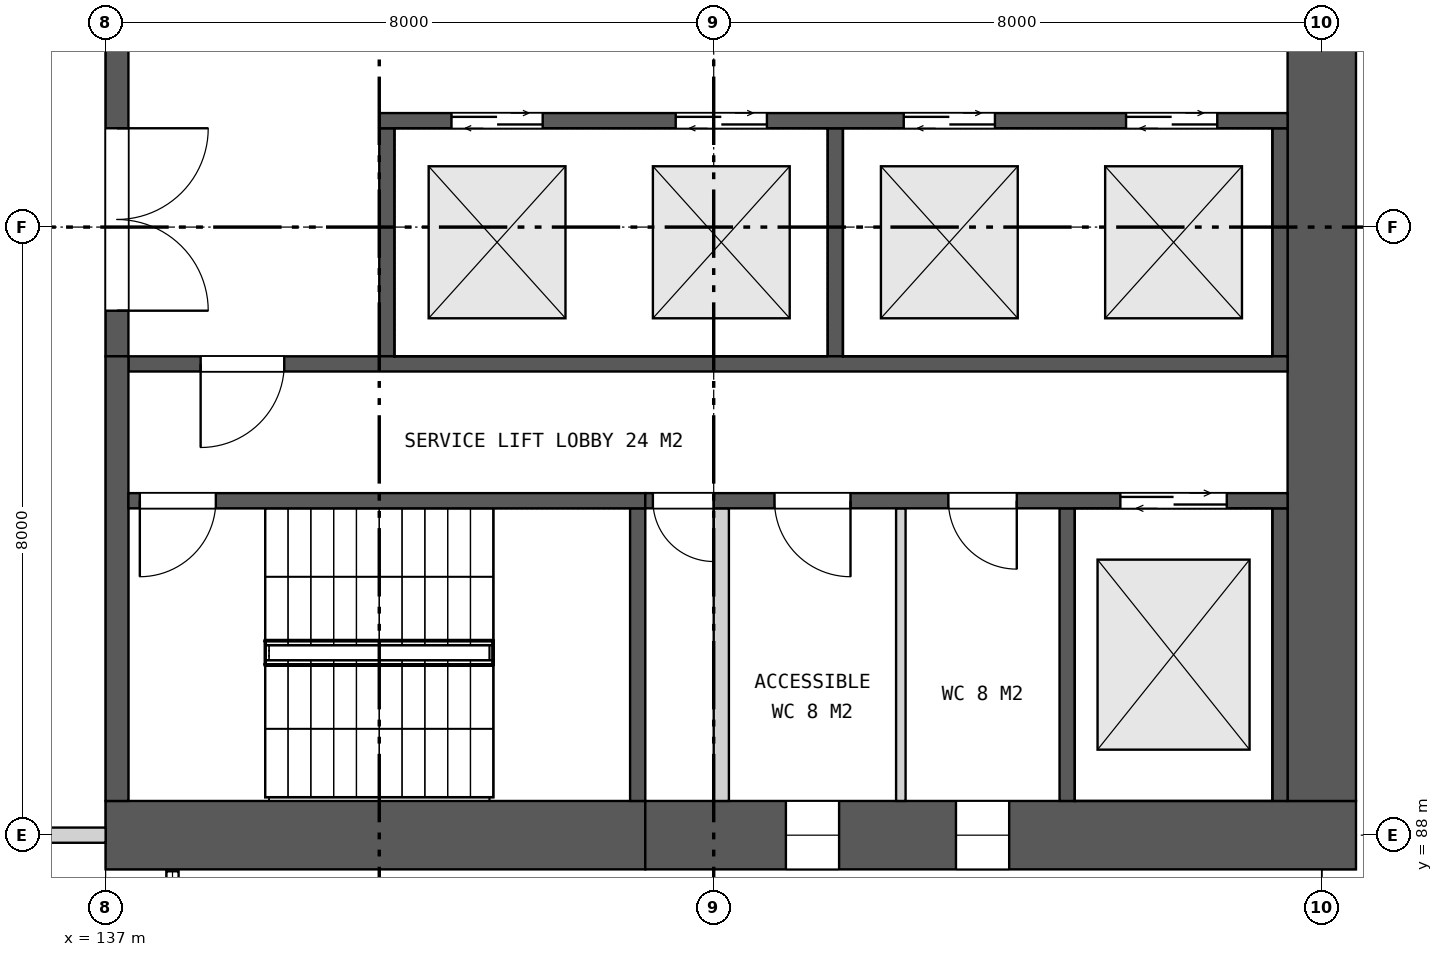
"""IFC4 building model, lengths in metres.
Left out: names, types, materials, properties, quantities, classifications, styles, units other than length and angle.
Written with IfcOpenShell. Run it as: python <this file> out.ifc"""

import sys

from ifc_helpers import new_model, si_unit, direction, frame, frame_2d, origin, place, context, subcontext, project, spatial, rectangle, extrude, element, fill, save


model = new_model("IFC4")
c1 = context("Model", 3, precision=1e-05, world=origin(), true_north=direction((0.0, 1.0)))
c2 = subcontext(c1, "Body", "Model", "MODEL_VIEW")
j1 = project(units=[si_unit("LENGTHUNIT", "METRE"), si_unit("PLANEANGLEUNIT", "RADIAN")], contexts=[c1])
p1 = place(None, origin())
s1 = spatial("IfcSite", under=j1, at=p1, CompositionType="ELEMENT")
p2 = place(p1, origin())
s2 = spatial("IfcBuilding", under=s1, at=p2, CompositionType="ELEMENT")
p3 = place(p2, frame((0.0, 0.0, 17.5)))
s3 = spatial("IfcBuildingStorey", under=s2, at=p3, CompositionType="ELEMENT", Elevation=17.5)
p4 = place(p3, frame((137.0, 88.0, 0.0), z_axis=(0.0, 0.0, 1.0), x_axis=(1.0, 0.0, 0.0)))
e1 = element("IfcWall", 1, at=p4, inside=s3, PredefinedType="SHEAR", context=c2, shape_type="SweptSolid", body=[
    extrude(rectangle(XDim=7.1, YDim=0.9, at=frame_2d((3.55, 0.0))), origin(), (0.0, 0.0, 1.0), 7.5),
])
p5 = place(p3, frame((144.1, 88.0, 0.0), z_axis=(0.0, 0.0, 1.0), x_axis=(1.0, 0.0, 0.0)))
e2 = element("IfcWall", 2, at=p5, inside=s3, PredefinedType="SHEAR", context=c2, shape_type="SweptSolid", body=[
    extrude(rectangle(XDim=9.35, YDim=0.9, at=frame_2d((4.675, 0.0))), origin(), (0.0, 0.0, 1.0), 7.5),
])
p6 = place(p5, frame((1.85, 0.0, 1.5)))
e3 = element("IfcOpeningElement", 3, at=p6, cuts=e2, PredefinedType="OPENING", context=c2, shape_type="SweptSolid", body=[
    extrude(rectangle(XDim=0.7, YDim=0.9, at=frame_2d((0.35, 0.45))), frame((0.0, 0.46, 0.0), z_axis=(0.0, -1.0, 0.0), x_axis=(1.0, 0.0, 0.0)), (0.0, 0.0, 1.0), 0.92),
])
p7 = place(p5, frame((4.087, 0.0, 1.5)))
e4 = element("IfcOpeningElement", 4, at=p7, cuts=e2, PredefinedType="OPENING", context=c2, shape_type="SweptSolid", body=[
    extrude(rectangle(XDim=0.7, YDim=0.9, at=frame_2d((0.35, 0.45))), frame((0.0, 0.46, 0.0), z_axis=(0.0, -1.0, 0.0), x_axis=(1.0, 0.0, 0.0)), (0.0, 0.0, 1.0), 0.92),
])
p8 = place(p3, frame((153.0, 88.45, 0.0), z_axis=(0.0, 0.0, 1.0), x_axis=(0.0, 1.0, 0.0)))
e5 = element("IfcWall", 5, at=p8, inside=s3, PredefinedType="SHEAR", context=c2, shape_type="SweptSolid", body=[
    extrude(rectangle(XDim=23.1, YDim=0.9, at=frame_2d((11.55, 0.0))), origin(), (0.0, 0.0, 1.0), 7.5),
])
p9 = place(p8, frame((10.35, 0.0, 0.0)))
e6 = element("IfcOpeningElement", 6, at=p9, cuts=e5, PredefinedType="OPENING", context=c2, shape_type="SweptSolid", body=[
    extrude(rectangle(XDim=2.4, YDim=2.4, at=frame_2d((1.2, 1.2))), frame((0.0, 0.46, 0.0), z_axis=(0.0, -1.0, 0.0), x_axis=(1.0, 0.0, 0.0)), (0.0, 0.0, 1.0), 0.92),
])
p10 = place(p3, frame((137.15, 94.3, 0.0), z_axis=(0.0, 0.0, 1.0), x_axis=(0.0, 1.0, 0.0)))
e7 = element("IfcWall", 7, at=p10, inside=s3, PredefinedType="SHEAR", context=c2, shape_type="SweptSolid", body=[
    extrude(rectangle(XDim=11.4, YDim=0.3, at=frame_2d((5.7, 0.0))), origin(), (0.0, 0.0, 1.0), 7.5),
])
p11 = place(p10, frame((0.6, 0.0, 0.0)))
e8 = element("IfcOpeningElement", 8, at=p11, cuts=e7, PredefinedType="OPENING", context=c2, shape_type="SweptSolid", body=[
    extrude(rectangle(XDim=2.4, YDim=2.4, at=frame_2d((1.2, 1.2))), frame((0.0, 0.16, 0.0), z_axis=(0.0, -1.0, 0.0), x_axis=(1.0, 0.0, 0.0)), (0.0, 0.0, 1.0), 0.32),
])
p12 = place(p10, frame((4.5, 0.0, 0.0)))
e9 = element("IfcOpeningElement", 9, at=p12, cuts=e7, PredefinedType="OPENING", context=c2, shape_type="SweptSolid", body=[
    extrude(rectangle(XDim=2.4, YDim=2.4, at=frame_2d((1.2, 1.2))), frame((0.0, 0.16, 0.0), z_axis=(0.0, -1.0, 0.0), x_axis=(1.0, 0.0, 0.0)), (0.0, 0.0, 1.0), 0.32),
])
p13 = place(p10, frame((8.4, 0.0, 0.0)))
e10 = element("IfcOpeningElement", 10, at=p13, cuts=e7, PredefinedType="OPENING", context=c2, shape_type="SweptSolid", body=[
    extrude(rectangle(XDim=2.4, YDim=2.4, at=frame_2d((1.2, 1.2))), frame((0.0, 0.16, 0.0), z_axis=(0.0, -1.0, 0.0), x_axis=(1.0, 0.0, 0.0)), (0.0, 0.0, 1.0), 0.32),
])
for number, where, z_axis, x_axis in (
    (11, (140.7, 94.3, 0.0), (0.0, 0.0, 1.0), (0.0, 1.0, 0.0)),
    (12, (146.6, 94.3, 0.0), (0.0, 0.0, 1.0), (0.0, 1.0, 0.0)),
    (13, (152.45, 94.3, 0.0), (0.0, 0.0, 1.0), (0.0, 1.0, 0.0)),
):
    element("IfcWall", number, at=place(p3, frame(where, z_axis=z_axis, x_axis=x_axis)), inside=s3, PredefinedType="SHEAR", context=c2, shape_type="SweptSolid", body=[
        extrude(rectangle(XDim=3.0, YDim=0.2, at=frame_2d((1.5, 0.0))), origin(), (0.0, 0.0, 1.0), 7.5),
    ])
p14 = place(p3, frame((140.6, 97.4, 0.0), z_axis=(0.0, 0.0, 1.0), x_axis=(1.0, 0.0, 0.0)))
e14 = element("IfcWall", 14, at=p14, inside=s3, PredefinedType="SHEAR", context=c2, shape_type="SweptSolid", body=[
    extrude(rectangle(XDim=11.95, YDim=0.2, at=frame_2d((5.975, 0.0))), origin(), (0.0, 0.0, 1.0), 7.5),
])
p15 = place(p14, frame((0.95, 0.0, 0.0)))
e15 = element("IfcOpeningElement", 15, at=p15, cuts=e14, PredefinedType="OPENING", context=c2, shape_type="SweptSolid", body=[
    extrude(rectangle(XDim=1.2, YDim=2.1, at=frame_2d((0.6, 1.05))), frame((0.0, 0.11, 0.0), z_axis=(0.0, -1.0, 0.0), x_axis=(1.0, 0.0, 0.0)), (0.0, 0.0, 1.0), 0.22),
])
p16 = place(p14, frame((3.9, 0.0, 0.0)))
e16 = element("IfcOpeningElement", 16, at=p16, cuts=e14, PredefinedType="OPENING", context=c2, shape_type="SweptSolid", body=[
    extrude(rectangle(XDim=1.2, YDim=2.1, at=frame_2d((0.6, 1.05))), frame((0.0, 0.11, 0.0), z_axis=(0.0, -1.0, 0.0), x_axis=(1.0, 0.0, 0.0)), (0.0, 0.0, 1.0), 0.22),
])
p17 = place(p14, frame((6.9, 0.0, 0.0)))
e17 = element("IfcOpeningElement", 17, at=p17, cuts=e14, PredefinedType="OPENING", context=c2, shape_type="SweptSolid", body=[
    extrude(rectangle(XDim=1.2, YDim=2.1, at=frame_2d((0.6, 1.05))), frame((0.0, 0.11, 0.0), z_axis=(0.0, -1.0, 0.0), x_axis=(1.0, 0.0, 0.0)), (0.0, 0.0, 1.0), 0.22),
])
p18 = place(p14, frame((9.825, 0.0, 0.0)))
e18 = element("IfcOpeningElement", 18, at=p18, cuts=e14, PredefinedType="OPENING", context=c2, shape_type="SweptSolid", body=[
    extrude(rectangle(XDim=1.2, YDim=2.1, at=frame_2d((0.6, 1.05))), frame((0.0, 0.11, 0.0), z_axis=(0.0, -1.0, 0.0), x_axis=(1.0, 0.0, 0.0)), (0.0, 0.0, 1.0), 0.22),
])
p19 = place(p3, frame((137.3, 94.2, 0.0), z_axis=(0.0, 0.0, 1.0), x_axis=(1.0, 0.0, 0.0)))
e19 = element("IfcWall", 19, at=p19, inside=s3, PredefinedType="SHEAR", context=c2, shape_type="SweptSolid", body=[
    extrude(rectangle(XDim=15.25, YDim=0.2, at=frame_2d((7.625, 0.0))), origin(), (0.0, 0.0, 1.0), 7.5),
])
p20 = place(p19, frame((0.95, 0.0, 0.0)))
e20 = element("IfcOpeningElement", 20, at=p20, cuts=e19, PredefinedType="OPENING", context=c2, shape_type="SweptSolid", body=[
    extrude(rectangle(XDim=1.1, YDim=2.1, at=frame_2d((0.55, 1.05))), frame((0.0, 0.11, 0.0), z_axis=(0.0, -1.0, 0.0), x_axis=(1.0, 0.0, 0.0)), (0.0, 0.0, 1.0), 0.22),
])
p21 = place(p3, frame((137.15, 88.45, 0.0), z_axis=(0.0, 0.0, 1.0), x_axis=(0.0, 1.0, 0.0)))
e21 = element("IfcWall", 21, at=p21, inside=s3, PredefinedType="SHEAR", context=c2, shape_type="SweptSolid", body=[
    extrude(rectangle(XDim=5.85, YDim=0.3, at=frame_2d((2.925, 0.0))), origin(), (0.0, 0.0, 1.0), 7.5),
])
for number, where, z_axis, x_axis in (
    (22, (144.0, 88.45, 0.0), (0.0, 0.0, 1.0), (0.0, 1.0, 0.0)),
    (23, (149.65, 88.45, 0.0), (0.0, 0.0, 1.0), (0.0, 1.0, 0.0)),
    (24, (152.45, 88.45, 0.0), (0.0, 0.0, 1.0), (0.0, 1.0, 0.0)),
):
    element("IfcWall", number, at=place(p3, frame(where, z_axis=z_axis, x_axis=x_axis)), inside=s3, PredefinedType="SHEAR", context=c2, shape_type="SweptSolid", body=[
        extrude(rectangle(XDim=3.85, YDim=0.2, at=frame_2d((1.925, 0.0))), origin(), (0.0, 0.0, 1.0), 7.5),
    ])
p22 = place(p3, frame((145.1, 88.45, 0.0), z_axis=(0.0, 0.0, 1.0), x_axis=(0.0, 1.0, 0.0)))
e25 = element("IfcWall", 25, at=p22, inside=s3, PredefinedType="PARTITIONING", context=c2, shape_type="SweptSolid", body=[
    extrude(rectangle(XDim=3.85, YDim=0.2, at=frame_2d((1.925, 0.0))), origin(), (0.0, 0.0, 1.0), 7.5),
])
p23 = place(p3, frame((147.462, 88.45, 0.0), z_axis=(0.0, 0.0, 1.0), x_axis=(0.0, 1.0, 0.0)))
e26 = element("IfcWall", 26, at=p23, inside=s3, PredefinedType="PARTITIONING", context=c2, shape_type="SweptSolid", body=[
    extrude(rectangle(XDim=3.85, YDim=0.125, at=frame_2d((1.925, 0.0))), origin(), (0.0, 0.0, 1.0), 7.5),
])
p24 = place(p3, frame((137.3, 92.4, 0.0), z_axis=(0.0, 0.0, 1.0), x_axis=(1.0, 0.0, 0.0)))
e27 = element("IfcWall", 27, at=p24, inside=s3, PredefinedType="SHEAR", context=c2, shape_type="SweptSolid", body=[
    extrude(rectangle(XDim=6.8, YDim=0.2, at=frame_2d((3.4, 0.0))), origin(), (0.0, 0.0, 1.0), 7.5),
])
p25 = place(p24, frame((0.15, 0.0, 0.0)))
e28 = element("IfcOpeningElement", 28, at=p25, cuts=e27, PredefinedType="OPENING", context=c2, shape_type="SweptSolid", body=[
    extrude(rectangle(XDim=1.0, YDim=2.1, at=frame_2d((0.5, 1.05))), frame((0.0, 0.11, 0.0), z_axis=(0.0, -1.0, 0.0), x_axis=(1.0, 0.0, 0.0)), (0.0, 0.0, 1.0), 0.22),
])
p26 = place(p3, frame((144.1, 92.4, 0.0), z_axis=(0.0, 0.0, 1.0), x_axis=(1.0, 0.0, 0.0)))
e29 = element("IfcWall", 29, at=p26, inside=s3, PredefinedType="SHEAR", context=c2, shape_type="SweptSolid", body=[
    extrude(rectangle(XDim=8.45, YDim=0.2, at=frame_2d((4.225, 0.0))), origin(), (0.0, 0.0, 1.0), 7.5),
])
p27 = place(p26, frame((0.1, 0.0, 0.0)))
e30 = element("IfcOpeningElement", 30, at=p27, cuts=e29, PredefinedType="OPENING", context=c2, shape_type="SweptSolid", body=[
    extrude(rectangle(XDim=0.8, YDim=2.1, at=frame_2d((0.4, 1.05))), frame((0.0, 0.11, 0.0), z_axis=(0.0, -1.0, 0.0), x_axis=(1.0, 0.0, 0.0)), (0.0, 0.0, 1.0), 0.22),
])
p28 = place(p26, frame((1.7, 0.0, 0.0)))
e31 = element("IfcOpeningElement", 31, at=p28, cuts=e29, PredefinedType="OPENING", context=c2, shape_type="SweptSolid", body=[
    extrude(rectangle(XDim=1.0, YDim=2.1, at=frame_2d((0.5, 1.05))), frame((0.0, 0.11, 0.0), z_axis=(0.0, -1.0, 0.0), x_axis=(1.0, 0.0, 0.0)), (0.0, 0.0, 1.0), 0.22),
])
p29 = place(p26, frame((3.987, 0.0, 0.0)))
e32 = element("IfcOpeningElement", 32, at=p29, cuts=e29, PredefinedType="OPENING", context=c2, shape_type="SweptSolid", body=[
    extrude(rectangle(XDim=0.9, YDim=2.1, at=frame_2d((0.45, 1.05))), frame((0.0, 0.11, 0.0), z_axis=(0.0, -1.0, 0.0), x_axis=(1.0, 0.0, 0.0)), (0.0, 0.0, 1.0), 0.22),
])
p30 = place(p26, frame((6.25, 0.0, 0.0)))
e33 = element("IfcOpeningElement", 33, at=p30, cuts=e29, PredefinedType="OPENING", context=c2, shape_type="SweptSolid", body=[
    extrude(rectangle(XDim=1.4, YDim=2.1, at=frame_2d((0.7, 1.05))), frame((0.0, 0.11, 0.0), z_axis=(0.0, -1.0, 0.0), x_axis=(1.0, 0.0, 0.0)), (0.0, 0.0, 1.0), 0.22),
])
p31 = place(p3, frame((129.6, 88.0, 0.0), z_axis=(0.0, 0.0, 1.0), x_axis=(1.0, 0.0, 0.0)))
e34 = element("IfcWall", 34, at=p31, inside=s3, PredefinedType="PARTITIONING", context=c2, shape_type="SweptSolid", body=[
    extrude(rectangle(XDim=7.4, YDim=0.2, at=frame_2d((3.7, 0.0))), origin(), (0.0, 0.0, 1.0), 6.551),
])
p32 = place(p31, frame((2.2, 0.0, 0.0)))
e35 = element("IfcOpeningElement", 35, at=p32, cuts=e34, PredefinedType="OPENING", context=c2, shape_type="SweptSolid", body=[
    extrude(rectangle(XDim=2.4, YDim=2.4, at=frame_2d((1.2, 1.2))), frame((0.0, 0.11, 0.0), z_axis=(0.0, -1.0, 0.0), x_axis=(1.0, 0.0, 0.0)), (0.0, 0.0, 1.0), 0.22),
])
p33 = place(p6, origin())
e36 = element("IfcWindow", 36, at=p33, inside=s3, PartitioningType="SINGLE_PANEL", PredefinedType="WINDOW", context=c2, shape_type="SweptSolid", body=[
    extrude(rectangle(XDim=0.7, YDim=0.9, at=frame_2d((0.35, 0.45))), frame((0.0, 0.03, 0.0), z_axis=(0.0, -1.0, 0.0), x_axis=(1.0, 0.0, 0.0)), (0.0, 0.0, 1.0), 0.06),
])
fill(e3, e36)
p34 = place(p7, origin())
e37 = element("IfcWindow", 37, at=p34, inside=s3, PartitioningType="SINGLE_PANEL", PredefinedType="WINDOW", context=c2, shape_type="SweptSolid", body=[
    extrude(rectangle(XDim=0.7, YDim=0.9, at=frame_2d((0.35, 0.45))), frame((0.0, 0.03, 0.0), z_axis=(0.0, -1.0, 0.0), x_axis=(1.0, 0.0, 0.0)), (0.0, 0.0, 1.0), 0.06),
])
fill(e4, e37)
p35 = place(p11, frame((2.4, 0.0, 0.0), z_axis=(0.0, 0.0, 1.0), x_axis=(-1.0, 0.0, 0.0)))
e38 = element("IfcDoor", 38, at=p35, inside=s3, OperationType="DOUBLE_DOOR_SINGLE_SWING", PredefinedType="DOOR", context=c2, shape_type="SweptSolid", body=[
    extrude(rectangle(XDim=2.4, YDim=2.4, at=frame_2d((1.2, 1.2))), frame((0.0, 0.025, 0.0), z_axis=(0.0, -1.0, 0.0), x_axis=(1.0, 0.0, 0.0)), (0.0, 0.0, 1.0), 0.05),
])
fill(e8, e38)
p36 = place(p15, origin())
e39 = element("IfcDoor", 39, at=p36, inside=s3, OperationType="DOUBLE_DOOR_SLIDING", PredefinedType="DOOR", context=c2, shape_type="SweptSolid", body=[
    extrude(rectangle(XDim=1.2, YDim=2.1, at=frame_2d((0.6, 1.05))), frame((0.0, 0.025, 0.0), z_axis=(0.0, -1.0, 0.0), x_axis=(1.0, 0.0, 0.0)), (0.0, 0.0, 1.0), 0.05),
])
fill(e15, e39)
p37 = place(p16, origin())
e40 = element("IfcDoor", 40, at=p37, inside=s3, OperationType="DOUBLE_DOOR_SLIDING", PredefinedType="DOOR", context=c2, shape_type="SweptSolid", body=[
    extrude(rectangle(XDim=1.2, YDim=2.1, at=frame_2d((0.6, 1.05))), frame((0.0, 0.025, 0.0), z_axis=(0.0, -1.0, 0.0), x_axis=(1.0, 0.0, 0.0)), (0.0, 0.0, 1.0), 0.05),
])
fill(e16, e40)
p38 = place(p17, origin())
e41 = element("IfcDoor", 41, at=p38, inside=s3, OperationType="DOUBLE_DOOR_SLIDING", PredefinedType="DOOR", context=c2, shape_type="SweptSolid", body=[
    extrude(rectangle(XDim=1.2, YDim=2.1, at=frame_2d((0.6, 1.05))), frame((0.0, 0.025, 0.0), z_axis=(0.0, -1.0, 0.0), x_axis=(1.0, 0.0, 0.0)), (0.0, 0.0, 1.0), 0.05),
])
fill(e17, e41)
p39 = place(p18, origin())
e42 = element("IfcDoor", 42, at=p39, inside=s3, OperationType="DOUBLE_DOOR_SLIDING", PredefinedType="DOOR", context=c2, shape_type="SweptSolid", body=[
    extrude(rectangle(XDim=1.2, YDim=2.1, at=frame_2d((0.6, 1.05))), frame((0.0, 0.025, 0.0), z_axis=(0.0, -1.0, 0.0), x_axis=(1.0, 0.0, 0.0)), (0.0, 0.0, 1.0), 0.05),
])
fill(e18, e42)
p40 = place(p20, frame((1.1, 0.0, 0.0), z_axis=(0.0, 0.0, 1.0), x_axis=(-1.0, 0.0, 0.0)))
e43 = element("IfcDoor", 43, at=p40, inside=s3, OperationType="SINGLE_SWING_RIGHT", PredefinedType="DOOR", context=c2, shape_type="SweptSolid", body=[
    extrude(rectangle(XDim=1.1, YDim=2.1, at=frame_2d((0.55, 1.05))), frame((0.0, 0.025, 0.0), z_axis=(0.0, -1.0, 0.0), x_axis=(1.0, 0.0, 0.0)), (0.0, 0.0, 1.0), 0.05),
])
fill(e20, e43)
p41 = place(p25, frame((1.0, 0.0, 0.0), z_axis=(0.0, 0.0, 1.0), x_axis=(-1.0, 0.0, 0.0)))
e44 = element("IfcDoor", 44, at=p41, inside=s3, OperationType="SINGLE_SWING_RIGHT", PredefinedType="DOOR", context=c2, shape_type="SweptSolid", body=[
    extrude(rectangle(XDim=1.0, YDim=2.1, at=frame_2d((0.5, 1.05))), frame((0.0, 0.025, 0.0), z_axis=(0.0, -1.0, 0.0), x_axis=(1.0, 0.0, 0.0)), (0.0, 0.0, 1.0), 0.05),
])
fill(e28, e44)
p42 = place(p27, frame((0.8, 0.0, 0.0), z_axis=(0.0, 0.0, 1.0), x_axis=(-1.0, 0.0, 0.0)))
e45 = element("IfcDoor", 45, at=p42, inside=s3, OperationType="SINGLE_SWING_LEFT", PredefinedType="DOOR", context=c2, shape_type="SweptSolid", body=[
    extrude(rectangle(XDim=0.8, YDim=2.1, at=frame_2d((0.4, 1.05))), frame((0.0, 0.025, 0.0), z_axis=(0.0, -1.0, 0.0), x_axis=(1.0, 0.0, 0.0)), (0.0, 0.0, 1.0), 0.05),
])
fill(e30, e45)
p43 = place(p28, frame((1.0, 0.0, 0.0), z_axis=(0.0, 0.0, 1.0), x_axis=(-1.0, 0.0, 0.0)))
e46 = element("IfcDoor", 46, at=p43, inside=s3, OperationType="SINGLE_SWING_LEFT", PredefinedType="DOOR", context=c2, shape_type="SweptSolid", body=[
    extrude(rectangle(XDim=1.0, YDim=2.1, at=frame_2d((0.5, 1.05))), frame((0.0, 0.025, 0.0), z_axis=(0.0, -1.0, 0.0), x_axis=(1.0, 0.0, 0.0)), (0.0, 0.0, 1.0), 0.05),
])
fill(e31, e46)
p44 = place(p29, frame((0.9, 0.0, 0.0), z_axis=(0.0, 0.0, 1.0), x_axis=(-1.0, 0.0, 0.0)))
e47 = element("IfcDoor", 47, at=p44, inside=s3, OperationType="SINGLE_SWING_LEFT", PredefinedType="DOOR", context=c2, shape_type="SweptSolid", body=[
    extrude(rectangle(XDim=0.9, YDim=2.1, at=frame_2d((0.45, 1.05))), frame((0.0, 0.025, 0.0), z_axis=(0.0, -1.0, 0.0), x_axis=(1.0, 0.0, 0.0)), (0.0, 0.0, 1.0), 0.05),
])
fill(e32, e47)
p45 = place(p30, origin())
e48 = element("IfcDoor", 48, at=p45, inside=s3, OperationType="DOUBLE_DOOR_SLIDING", PredefinedType="DOOR", context=c2, shape_type="SweptSolid", body=[
    extrude(rectangle(XDim=1.4, YDim=2.1, at=frame_2d((0.7, 1.05))), frame((0.0, 0.025, 0.0), z_axis=(0.0, -1.0, 0.0), x_axis=(1.0, 0.0, 0.0)), (0.0, 0.0, 1.0), 0.05),
])
fill(e33, e48)
save(model, sys.argv[1])
